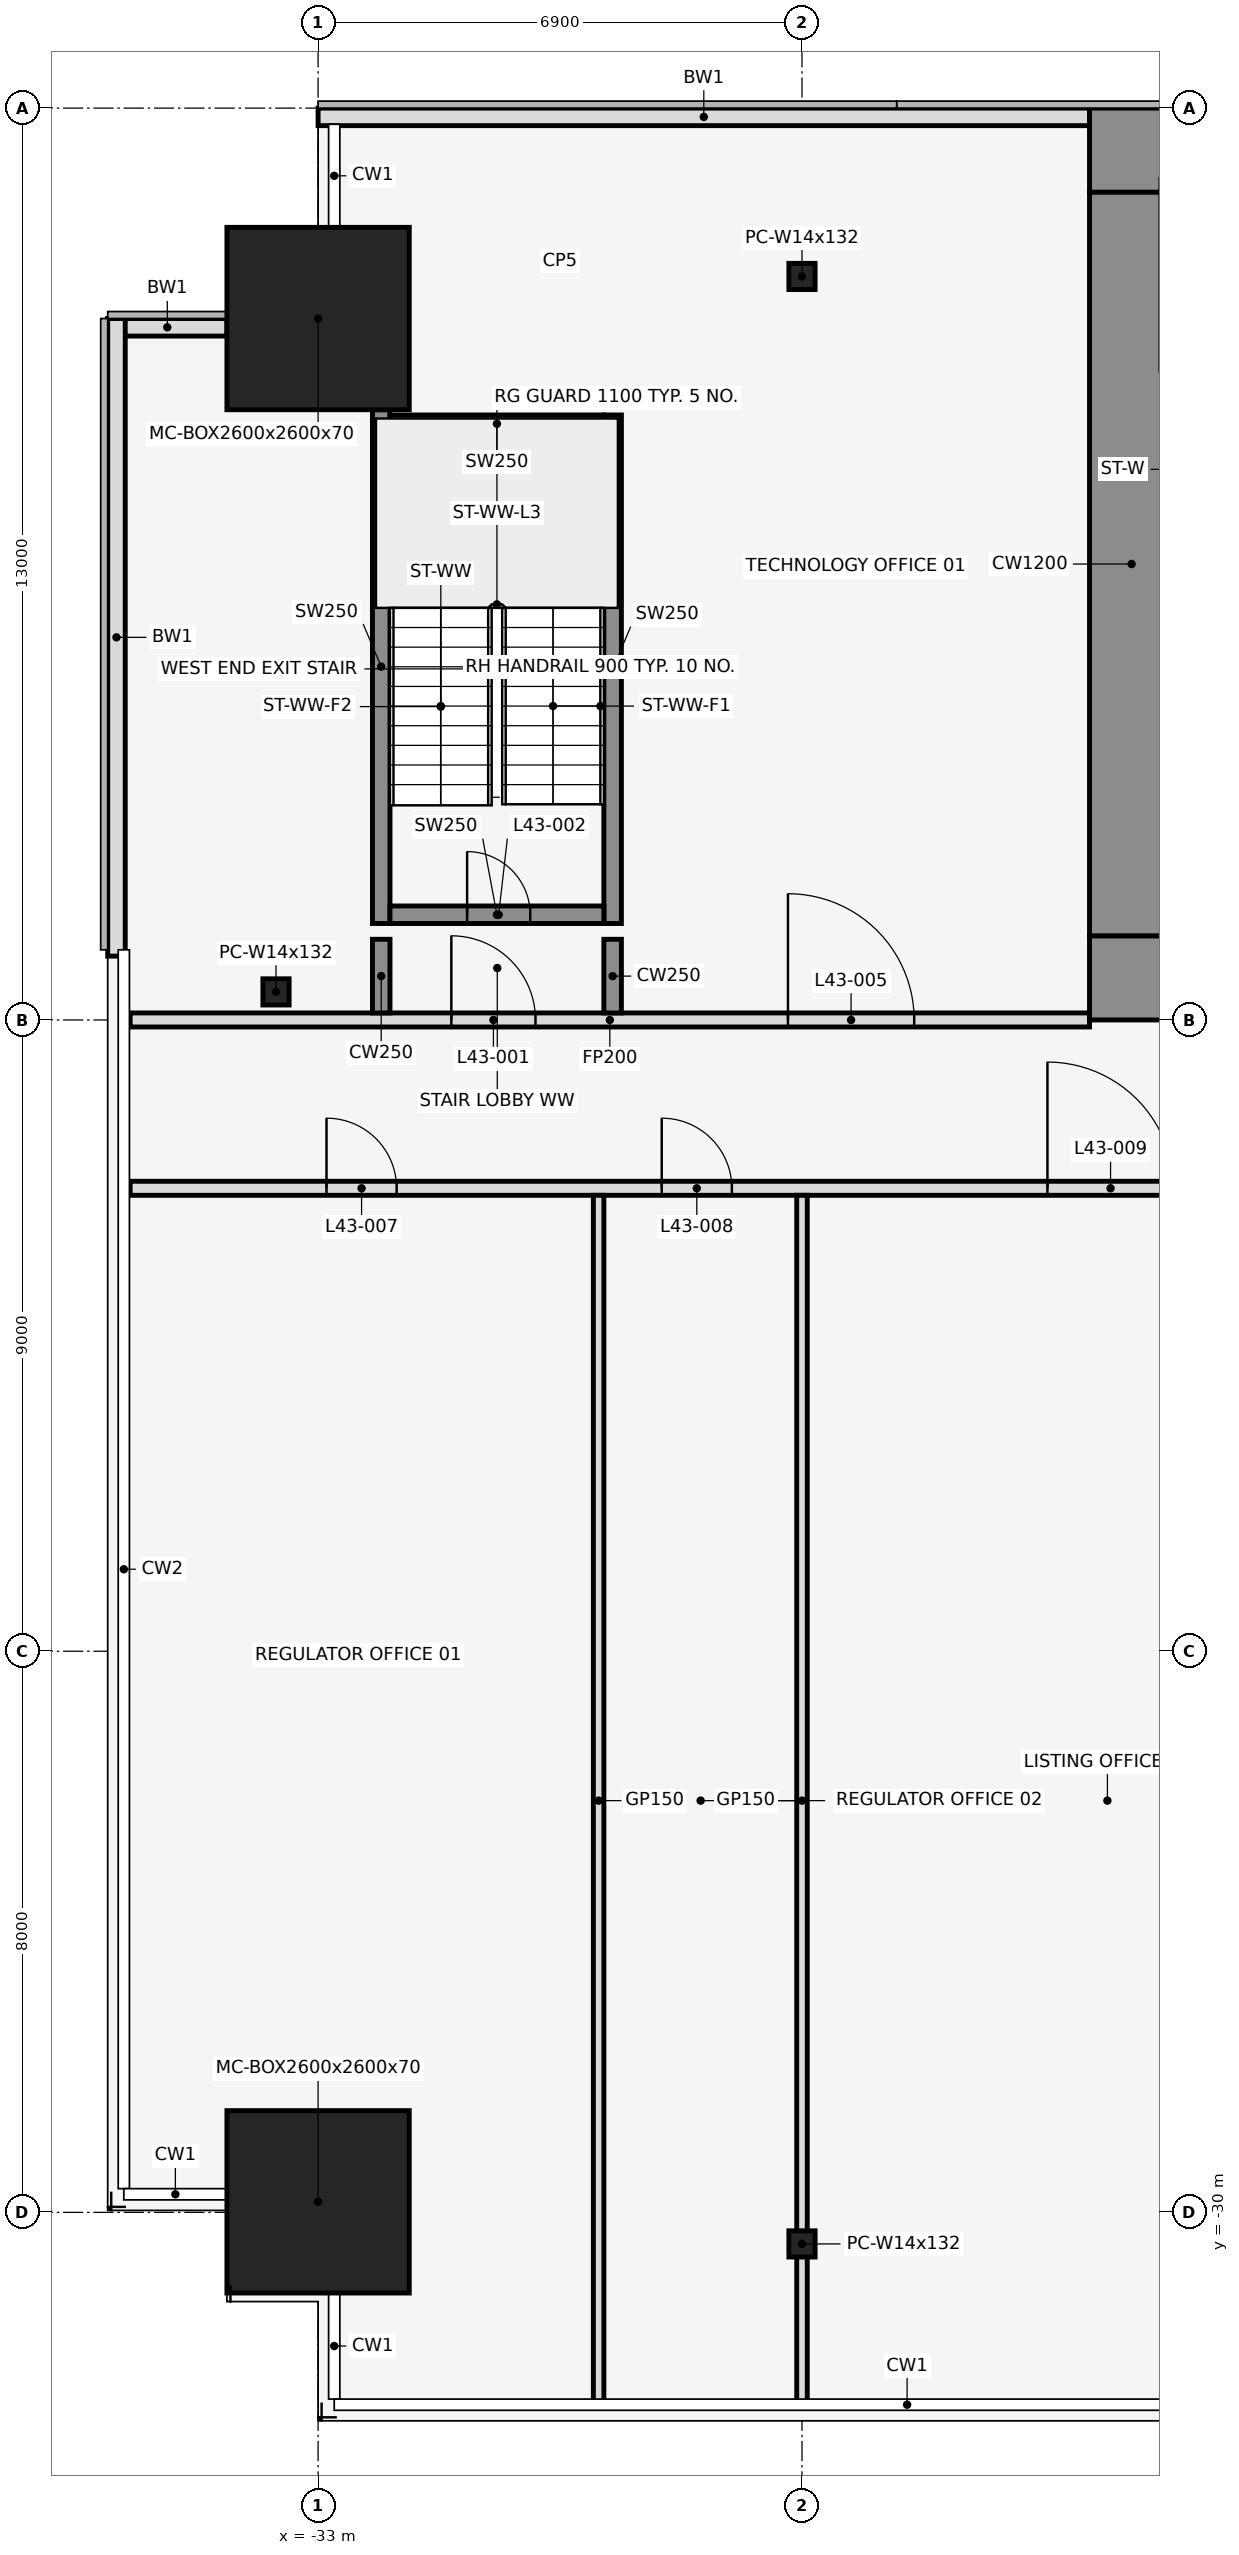
"""IFC4 building model, lengths in metres.
Left out: names, types, materials, properties, quantities, classifications, styles, units other than length and angle.
Written with IfcOpenShell. Run it as: python <this file> out.ifc"""

import sys

from ifc_helpers import new_model, si_unit, direction, frame, frame_2d, origin, origin_2d, place, context, subcontext, project, spatial, rectangle, hollow_rectangle, i_section, extrude, element, fill, save


model = new_model("IFC4")
c1 = context("Model", 3, precision=1e-05, world=origin(), true_north=direction((0.0, 1.0)))
c2 = subcontext(c1, "Body", "Model", "MODEL_VIEW")
j1 = project(units=[si_unit("LENGTHUNIT", "METRE"), si_unit("PLANEANGLEUNIT", "RADIAN")], contexts=[c1])
p1 = place(None, origin())
s1 = spatial("IfcSite", under=j1, at=p1, CompositionType="ELEMENT")
p2 = place(p1, origin())
s2 = spatial("IfcBuilding", under=s1, at=p2, CompositionType="ELEMENT")
p3 = place(p2, frame((0.0, 0.0, 195.0)))
s3 = spatial("IfcBuildingStorey", under=s2, at=p3, CompositionType="ELEMENT", Elevation=195.0)
for number, where, z_axis, x_axis in (
    (1, (-33.0, -29.85, 0.0), (0.0, 0.0, 1.0), (1.0, 0.0, 0.0)),
    (2, (-33.0, -3.0, 0.0), (0.0, 0.0, 1.0), (1.0, 0.0, 0.0)),
):
    element("IfcColumn", number, at=place(p3, frame(where, z_axis=z_axis, x_axis=x_axis)), inside=s3, PredefinedType="COLUMN", context=c2, shape_type="SweptSolid", body=[
        extrude(hollow_rectangle(XDim=2.6, YDim=2.6, WallThickness=0.07, at=origin_2d()), origin(), (0.0, 0.0, 1.0), 4.1),
    ])
for number, where, z_axis, x_axis in (
    (3, (-26.1, -30.45, 0.0), (0.0, 0.0, 1.0), (1.0, 0.0, 0.0)),
    (4, (-26.1, -2.4, 0.0), (0.0, 0.0, 1.0), (1.0, 0.0, 0.0)),
    (5, (-33.6, -12.6, 0.0), (0.0, 0.0, 1.0), (1.0, 0.0, 0.0)),
):
    element("IfcColumn", number, at=place(p3, frame(where, z_axis=z_axis, x_axis=x_axis)), inside=s3, PredefinedType="COLUMN", context=c2, shape_type="SweptSolid", body=[
        extrude(i_section(OverallWidth=0.373, OverallDepth=0.373, WebThickness=0.016, FlangeThickness=0.026, at=origin_2d()), origin(), (0.0, 0.0, 1.0), 4.1),
    ])
p4 = place(p3, frame((-22.0, -0.125, 0.0), z_axis=(0.0, 0.0, 1.0), x_axis=(-1.0, 0.0, 0.0)))
e6 = element("IfcWall", 6, at=p4, inside=s3, PredefinedType="STANDARD", context=c2, shape_type="SweptSolid", body=[
    extrude(rectangle(XDim=11.0, YDim=0.25, at=frame_2d((5.5, 0.0))), origin(), (0.0, 0.0, 1.0), 3.95),
])
p5 = place(p3, frame((-34.3, -3.125, 0.0), z_axis=(0.0, 0.0, 1.0), x_axis=(-1.0, 0.0, 0.0)))
e7 = element("IfcWall", 7, at=p5, inside=s3, PredefinedType="STANDARD", context=c2, shape_type="SweptSolid", body=[
    extrude(rectangle(XDim=1.7, YDim=0.25, at=frame_2d((0.85, 0.0))), origin(), (0.0, 0.0, 1.0), 3.95),
])
p6 = place(p3, frame((-35.875, -3.0, 0.0), z_axis=(0.0, 0.0, 1.0), x_axis=(0.0, -1.0, 0.0)))
e8 = element("IfcWall", 8, at=p6, inside=s3, PredefinedType="STANDARD", context=c2, shape_type="SweptSolid", body=[
    extrude(rectangle(XDim=9.09, YDim=0.25, at=frame_2d((4.545, 0.0))), origin(), (0.0, 0.0, 1.0), 3.95),
])
p7 = place(p3, frame((-32.1, -11.625, 0.0), z_axis=(0.0, 0.0, 1.0), x_axis=(0.0, 1.0, 0.0)))
e9 = element("IfcWall", 9, at=p7, inside=s3, PredefinedType="SHEAR", context=c2, shape_type="SweptSolid", body=[
    extrude(rectangle(XDim=7.325, YDim=0.25, at=frame_2d((3.663, 0.0))), origin(), (0.0, 0.0, 1.0), 4.1),
])
p8 = place(p3, frame((-28.8, -11.625, 0.0), z_axis=(0.0, 0.0, 1.0), x_axis=(0.0, 1.0, 0.0)))
e10 = element("IfcWall", 10, at=p8, inside=s3, PredefinedType="SHEAR", context=c2, shape_type="SweptSolid", body=[
    extrude(rectangle(XDim=7.25, YDim=0.25, at=frame_2d((3.625, 0.0))), origin(), (0.0, 0.0, 1.0), 4.1),
])
p9 = place(p3, frame((-31.975, -11.5, 0.0), z_axis=(0.0, 0.0, 1.0), x_axis=(1.0, 0.0, 0.0)))
e11 = element("IfcWall", 11, at=p9, inside=s3, PredefinedType="SHEAR", context=c2, shape_type="SweptSolid", body=[
    extrude(rectangle(XDim=3.05, YDim=0.25, at=frame_2d((1.525, 0.0))), origin(), (0.0, 0.0, 1.0), 4.1),
])
p10 = place(p9, frame((1.1, 0.0, 0.0)))
e12 = element("IfcOpeningElement", 12, at=p10, cuts=e11, PredefinedType="OPENING", context=c2, shape_type="SweptSolid", body=[
    extrude(rectangle(XDim=0.9, YDim=2.1, at=frame_2d((0.45, 1.05))), frame((0.0, 0.137, 0.0), z_axis=(0.0, -1.0, 0.0), x_axis=(1.0, 0.0, 0.0)), (0.0, 0.0, 1.0), 0.274),
])
p11 = place(p3, frame((-31.975, -4.5, 0.0), z_axis=(0.0, 0.0, 1.0), x_axis=(1.0, 0.0, 0.0)))
e13 = element("IfcWall", 13, at=p11, inside=s3, PredefinedType="SHEAR", context=c2, shape_type="SweptSolid", body=[
    extrude(rectangle(XDim=3.05, YDim=0.25, at=frame_2d((1.525, 0.0))), origin(), (0.0, 0.0, 1.0), 4.1),
])
p12 = place(p3, frame((-35.68, -15.4, 0.0), z_axis=(0.0, 0.0, 1.0), x_axis=(1.0, 0.0, 0.0)))
e14 = element("IfcWall", 14, at=p12, inside=s3, PredefinedType="PARTITIONING", context=c2, shape_type="SweptSolid", body=[
    extrude(rectangle(XDim=71.36, YDim=0.2, at=frame_2d((35.68, 0.0))), origin(), (0.0, 0.0, 1.0), 2.84),
])
p13 = place(p12, frame((2.8, 0.0, 0.0)))
e15 = element("IfcOpeningElement", 15, at=p13, cuts=e14, PredefinedType="OPENING", context=c2, shape_type="SweptSolid", body=[
    extrude(rectangle(XDim=1.0, YDim=2.1, at=frame_2d((0.5, 1.05))), frame((0.0, 0.112, 0.0), z_axis=(0.0, -1.0, 0.0), x_axis=(1.0, 0.0, 0.0)), (0.0, 0.0, 1.0), 0.224),
])
p14 = place(p12, frame((7.58, 0.0, 0.0)))
e16 = element("IfcOpeningElement", 16, at=p14, cuts=e14, PredefinedType="OPENING", context=c2, shape_type="SweptSolid", body=[
    extrude(rectangle(XDim=1.0, YDim=2.1, at=frame_2d((0.5, 1.05))), frame((0.0, 0.112, 0.0), z_axis=(0.0, -1.0, 0.0), x_axis=(1.0, 0.0, 0.0)), (0.0, 0.0, 1.0), 0.224),
])
p15 = place(p12, frame((13.08, 0.0, 0.0)))
e17 = element("IfcOpeningElement", 17, at=p15, cuts=e14, PredefinedType="OPENING", context=c2, shape_type="SweptSolid", body=[
    extrude(rectangle(XDim=1.8, YDim=2.1, at=frame_2d((0.9, 1.05))), frame((0.0, 0.112, 0.0), z_axis=(0.0, -1.0, 0.0), x_axis=(1.0, 0.0, 0.0)), (0.0, 0.0, 1.0), 0.224),
])
p16 = place(p12, frame((19.18, 0.0, 0.0)))
e18 = element("IfcOpeningElement", 18, at=p16, cuts=e14, PredefinedType="OPENING", context=c2, shape_type="SweptSolid", body=[
    extrude(rectangle(XDim=1.0, YDim=2.1, at=frame_2d((0.5, 1.05))), frame((0.0, 0.112, 0.0), z_axis=(0.0, -1.0, 0.0), x_axis=(1.0, 0.0, 0.0)), (0.0, 0.0, 1.0), 0.224),
])
p17 = place(p12, frame((26.08, 0.0, 0.0)))
e19 = element("IfcOpeningElement", 19, at=p17, cuts=e14, PredefinedType="OPENING", context=c2, shape_type="SweptSolid", body=[
    extrude(rectangle(XDim=1.8, YDim=2.1, at=frame_2d((0.9, 1.05))), frame((0.0, 0.112, 0.0), z_axis=(0.0, -1.0, 0.0), x_axis=(1.0, 0.0, 0.0)), (0.0, 0.0, 1.0), 0.224),
])
p18 = place(p12, frame((36.18, 0.0, 0.0)))
e20 = element("IfcOpeningElement", 20, at=p18, cuts=e14, PredefinedType="OPENING", context=c2, shape_type="SweptSolid", body=[
    extrude(rectangle(XDim=1.8, YDim=2.1, at=frame_2d((0.9, 1.05))), frame((0.0, 0.112, 0.0), z_axis=(0.0, -1.0, 0.0), x_axis=(1.0, 0.0, 0.0)), (0.0, 0.0, 1.0), 0.224),
])
p19 = place(p12, frame((43.88, 0.0, 0.0)))
e21 = element("IfcOpeningElement", 21, at=p19, cuts=e14, PredefinedType="OPENING", context=c2, shape_type="SweptSolid", body=[
    extrude(rectangle(XDim=1.0, YDim=2.1, at=frame_2d((0.5, 1.05))), frame((0.0, 0.112, 0.0), z_axis=(0.0, -1.0, 0.0), x_axis=(1.0, 0.0, 0.0)), (0.0, 0.0, 1.0), 0.224),
])
p20 = place(p12, frame((51.18, 0.0, 0.0)))
e22 = element("IfcOpeningElement", 22, at=p20, cuts=e14, PredefinedType="OPENING", context=c2, shape_type="SweptSolid", body=[
    extrude(rectangle(XDim=0.9, YDim=2.1, at=frame_2d((0.45, 1.05))), frame((0.0, 0.112, 0.0), z_axis=(0.0, -1.0, 0.0), x_axis=(1.0, 0.0, 0.0)), (0.0, 0.0, 1.0), 0.224),
])
p21 = place(p12, frame((57.98, 0.0, 0.0)))
e23 = element("IfcOpeningElement", 23, at=p21, cuts=e14, PredefinedType="OPENING", context=c2, shape_type="SweptSolid", body=[
    extrude(rectangle(XDim=1.8, YDim=2.1, at=frame_2d((0.9, 1.05))), frame((0.0, 0.112, 0.0), z_axis=(0.0, -1.0, 0.0), x_axis=(1.0, 0.0, 0.0)), (0.0, 0.0, 1.0), 0.224),
])
p22 = place(p12, frame((65.68, 0.0, 0.0)))
e24 = element("IfcOpeningElement", 24, at=p22, cuts=e14, PredefinedType="OPENING", context=c2, shape_type="SweptSolid", body=[
    extrude(rectangle(XDim=1.8, YDim=2.1, at=frame_2d((0.9, 1.05))), frame((0.0, 0.112, 0.0), z_axis=(0.0, -1.0, 0.0), x_axis=(1.0, 0.0, 0.0)), (0.0, 0.0, 1.0), 0.224),
])
p23 = place(p3, frame((-35.68, -13.0, 0.0), z_axis=(0.0, 0.0, 1.0), x_axis=(1.0, 0.0, 0.0)))
e25 = element("IfcWall", 25, at=p23, inside=s3, PredefinedType="PARTITIONING", context=c2, shape_type="SweptSolid", body=[
    extrude(rectangle(XDim=13.68, YDim=0.2, at=frame_2d((6.84, 0.0))), origin(), (0.0, 0.0, 1.0), 2.84),
])
p24 = place(p23, frame((4.58, 0.0, 0.0)))
e26 = element("IfcOpeningElement", 26, at=p24, cuts=e25, PredefinedType="OPENING", context=c2, shape_type="SweptSolid", body=[
    extrude(rectangle(XDim=1.2, YDim=2.1, at=frame_2d((0.6, 1.05))), frame((0.0, 0.112, 0.0), z_axis=(0.0, -1.0, 0.0), x_axis=(1.0, 0.0, 0.0)), (0.0, 0.0, 1.0), 0.224),
])
p25 = place(p23, frame((9.38, 0.0, 0.0)))
e27 = element("IfcOpeningElement", 27, at=p25, cuts=e25, PredefinedType="OPENING", context=c2, shape_type="SweptSolid", body=[
    extrude(rectangle(XDim=1.8, YDim=2.1, at=frame_2d((0.9, 1.05))), frame((0.0, 0.112, 0.0), z_axis=(0.0, -1.0, 0.0), x_axis=(1.0, 0.0, 0.0)), (0.0, 0.0, 1.0), 0.224),
])
p26 = place(p3, frame((-32.1, -12.9, 0.0), z_axis=(0.0, 0.0, 1.0), x_axis=(0.0, 1.0, 0.0)))
e28 = element("IfcWall", 28, at=p26, inside=s3, PredefinedType="SHEAR", context=c2, shape_type="SweptSolid", body=[
    extrude(rectangle(XDim=1.05, YDim=0.25, at=frame_2d((0.525, 0.0))), origin(), (0.0, 0.0, 1.0), 4.1),
])
p27 = place(p3, frame((-29.0, -32.76, 0.0), z_axis=(0.0, 0.0, 1.0), x_axis=(0.0, 1.0, 0.0)))
e29 = element("IfcWall", 29, at=p27, inside=s3, PredefinedType="PARTITIONING", context=c2, shape_type="SweptSolid", body=[
    extrude(rectangle(XDim=17.26, YDim=0.15, at=frame_2d((8.63, 0.0))), origin(), (0.0, 0.0, 1.0), 2.84),
])
p28 = place(p3, frame((-28.8, -12.9, 0.0), z_axis=(0.0, 0.0, 1.0), x_axis=(0.0, 1.0, 0.0)))
e30 = element("IfcWall", 30, at=p28, inside=s3, PredefinedType="SHEAR", context=c2, shape_type="SweptSolid", body=[
    extrude(rectangle(XDim=1.05, YDim=0.25, at=frame_2d((0.525, 0.0))), origin(), (0.0, 0.0, 1.0), 4.1),
])
p29 = place(p3, frame((-26.1, -32.76, 0.0), z_axis=(0.0, 0.0, 1.0), x_axis=(0.0, 1.0, 0.0)))
e31 = element("IfcWall", 31, at=p29, inside=s3, PredefinedType="PARTITIONING", context=c2, shape_type="SweptSolid", body=[
    extrude(rectangle(XDim=17.26, YDim=0.15, at=frame_2d((8.63, 0.0))), origin(), (0.0, 0.0, 1.0), 2.84),
])
p30 = place(p3, frame((-22.0, -0.6, 0.0), z_axis=(0.0, 0.0, 1.0), x_axis=(1.0, 0.0, 0.0)))
e32 = element("IfcWall", 32, at=p30, inside=s3, PredefinedType="SHEAR", context=c2, shape_type="SweptSolid", body=[
    extrude(rectangle(XDim=44.0, YDim=1.2, at=frame_2d((22.0, 0.0))), origin(), (0.0, 0.0, 1.0), 4.1),
])
p31 = place(p30, frame((18.55, 0.0, 0.0)))
e33 = element("IfcOpeningElement", 33, at=p31, cuts=e32, PredefinedType="OPENING", context=c2, shape_type="SweptSolid", body=[
    extrude(rectangle(XDim=0.9, YDim=2.1, at=frame_2d((0.45, 1.05))), frame((0.0, 0.612, 0.0), z_axis=(0.0, -1.0, 0.0), x_axis=(1.0, 0.0, 0.0)), (0.0, 0.0, 1.0), 1.224),
])
p32 = place(p30, frame((24.55, 0.0, 0.0)))
e34 = element("IfcOpeningElement", 34, at=p32, cuts=e32, PredefinedType="OPENING", context=c2, shape_type="SweptSolid", body=[
    extrude(rectangle(XDim=0.9, YDim=2.1, at=frame_2d((0.45, 1.05))), frame((0.0, 0.612, 0.0), z_axis=(0.0, -1.0, 0.0), x_axis=(1.0, 0.0, 0.0)), (0.0, 0.0, 1.0), 1.224),
])
p33 = place(p3, frame((-22.0, -12.4, 0.0), z_axis=(0.0, 0.0, 1.0), x_axis=(1.0, 0.0, 0.0)))
e35 = element("IfcWall", 35, at=p33, inside=s3, PredefinedType="SHEAR", context=c2, shape_type="SweptSolid", body=[
    extrude(rectangle(XDim=44.0, YDim=1.2, at=frame_2d((22.0, 0.0))), origin(), (0.0, 0.0, 1.0), 4.1),
])
p34 = place(p33, frame((2.2, 0.0, 0.0)))
e36 = element("IfcOpeningElement", 36, at=p34, cuts=e35, PredefinedType="OPENING", context=c2, shape_type="SweptSolid", body=[
    extrude(rectangle(XDim=1.2, YDim=2.1, at=frame_2d((0.6, 1.05))), frame((0.0, 0.612, 0.0), z_axis=(0.0, -1.0, 0.0), x_axis=(1.0, 0.0, 0.0)), (0.0, 0.0, 1.0), 1.224),
])
p35 = place(p33, frame((21.4, 0.0, 0.0)))
e37 = element("IfcOpeningElement", 37, at=p35, cuts=e35, PredefinedType="OPENING", context=c2, shape_type="SweptSolid", body=[
    extrude(rectangle(XDim=1.2, YDim=2.1, at=frame_2d((0.6, 1.05))), frame((0.0, 0.612, 0.0), z_axis=(0.0, -1.0, 0.0), x_axis=(1.0, 0.0, 0.0)), (0.0, 0.0, 1.0), 1.224),
])
p36 = place(p33, frame((40.6, 0.0, 0.0)))
e38 = element("IfcOpeningElement", 38, at=p36, cuts=e35, PredefinedType="OPENING", context=c2, shape_type="SweptSolid", body=[
    extrude(rectangle(XDim=1.2, YDim=2.1, at=frame_2d((0.6, 1.05))), frame((0.0, 0.612, 0.0), z_axis=(0.0, -1.0, 0.0), x_axis=(1.0, 0.0, 0.0)), (0.0, 0.0, 1.0), 1.224),
])
p37 = place(p33, frame((16.0, 0.0, 0.0)))
e39 = element("IfcOpeningElement", 39, at=p37, cuts=e35, PredefinedType="OPENING", context=c2, shape_type="SweptSolid", body=[
    extrude(rectangle(XDim=1.8, YDim=2.1, at=frame_2d((0.9, 1.05))), frame((0.0, 0.612, 0.0), z_axis=(0.0, -1.0, 0.0), x_axis=(1.0, 0.0, 0.0)), (0.0, 0.0, 1.0), 1.224),
])
p38 = place(p33, frame((6.3, 0.0, 0.0)))
e40 = element("IfcOpeningElement", 40, at=p38, cuts=e35, PredefinedType="OPENING", context=c2, shape_type="SweptSolid", body=[
    extrude(rectangle(XDim=1.2, YDim=2.1, at=frame_2d((0.6, 1.05))), frame((0.0, 0.612, 0.0), z_axis=(0.0, -1.0, 0.0), x_axis=(1.0, 0.0, 0.0)), (0.0, 0.0, 1.0), 1.224),
])
p39 = place(p33, frame((26.2, 0.0, 0.0)))
e41 = element("IfcOpeningElement", 41, at=p39, cuts=e35, PredefinedType="OPENING", context=c2, shape_type="SweptSolid", body=[
    extrude(rectangle(XDim=1.8, YDim=2.1, at=frame_2d((0.9, 1.05))), frame((0.0, 0.612, 0.0), z_axis=(0.0, -1.0, 0.0), x_axis=(1.0, 0.0, 0.0)), (0.0, 0.0, 1.0), 1.224),
])
p40 = place(p33, frame((36.5, 0.0, 0.0)))
e42 = element("IfcOpeningElement", 42, at=p40, cuts=e35, PredefinedType="OPENING", context=c2, shape_type="SweptSolid", body=[
    extrude(rectangle(XDim=1.2, YDim=2.1, at=frame_2d((0.6, 1.05))), frame((0.0, 0.612, 0.0), z_axis=(0.0, -1.0, 0.0), x_axis=(1.0, 0.0, 0.0)), (0.0, 0.0, 1.0), 1.224),
])
p41 = place(p3, frame((-21.4, -11.8, 0.0), z_axis=(0.0, 0.0, 1.0), x_axis=(0.0, 1.0, 0.0)))
e43 = element("IfcWall", 43, at=p41, inside=s3, PredefinedType="SHEAR", context=c2, shape_type="SweptSolid", body=[
    extrude(rectangle(XDim=10.6, YDim=1.2, at=frame_2d((5.3, 0.0))), origin(), (0.0, 0.0, 1.0), 4.1),
])
p42 = place(p24, origin())
e44 = element("IfcDoor", 44, at=p42, inside=s3, OperationType="SINGLE_SWING_LEFT", PredefinedType="DOOR", context=c2, shape_type="SweptSolid", body=[
    extrude(rectangle(XDim=1.2, YDim=2.1, at=frame_2d((0.6, 1.05))), frame((0.0, 0.025, 0.0), z_axis=(0.0, -1.0, 0.0), x_axis=(1.0, 0.0, 0.0)), (0.0, 0.0, 1.0), 0.05),
])
fill(e26, e44)
p43 = place(p10, origin())
e45 = element("IfcDoor", 45, at=p43, inside=s3, OperationType="SINGLE_SWING_LEFT", PredefinedType="DOOR", context=c2, shape_type="SweptSolid", body=[
    extrude(rectangle(XDim=0.9, YDim=2.1, at=frame_2d((0.45, 1.05))), frame((0.0, 0.025, 0.0), z_axis=(0.0, -1.0, 0.0), x_axis=(1.0, 0.0, 0.0)), (0.0, 0.0, 1.0), 0.05),
])
fill(e12, e45)
p44 = place(p25, origin())
e46 = element("IfcDoor", 46, at=p44, inside=s3, OperationType="SINGLE_SWING_LEFT", PredefinedType="DOOR", context=c2, shape_type="SweptSolid", body=[
    extrude(rectangle(XDim=1.8, YDim=2.1, at=frame_2d((0.9, 1.05))), frame((0.0, 0.025, 0.0), z_axis=(0.0, -1.0, 0.0), x_axis=(1.0, 0.0, 0.0)), (0.0, 0.0, 1.0), 0.05),
])
fill(e27, e46)
p45 = place(p13, frame((1.0, 0.0, 0.0), z_axis=(0.0, 0.0, 1.0), x_axis=(-1.0, 0.0, 0.0)))
e47 = element("IfcDoor", 47, at=p45, inside=s3, OperationType="SINGLE_SWING_LEFT", PredefinedType="DOOR", context=c2, shape_type="SweptSolid", body=[
    extrude(rectangle(XDim=1.0, YDim=2.1, at=frame_2d((0.5, 1.05))), frame((0.0, 0.025, 0.0), z_axis=(0.0, -1.0, 0.0), x_axis=(1.0, 0.0, 0.0)), (0.0, 0.0, 1.0), 0.05),
])
fill(e15, e47)
p46 = place(p14, frame((1.0, 0.0, 0.0), z_axis=(0.0, 0.0, 1.0), x_axis=(-1.0, 0.0, 0.0)))
e48 = element("IfcDoor", 48, at=p46, inside=s3, OperationType="SINGLE_SWING_RIGHT", PredefinedType="DOOR", context=c2, shape_type="SweptSolid", body=[
    extrude(rectangle(XDim=1.0, YDim=2.1, at=frame_2d((0.5, 1.05))), frame((0.0, 0.025, 0.0), z_axis=(0.0, -1.0, 0.0), x_axis=(1.0, 0.0, 0.0)), (0.0, 0.0, 1.0), 0.05),
])
fill(e16, e48)
p47 = place(p15, origin())
e49 = element("IfcDoor", 49, at=p47, inside=s3, OperationType="SINGLE_SWING_LEFT", PredefinedType="DOOR", context=c2, shape_type="SweptSolid", body=[
    extrude(rectangle(XDim=1.8, YDim=2.1, at=frame_2d((0.9, 1.05))), frame((0.0, 0.025, 0.0), z_axis=(0.0, -1.0, 0.0), x_axis=(1.0, 0.0, 0.0)), (0.0, 0.0, 1.0), 0.05),
])
fill(e17, e49)
save(model, sys.argv[1])
